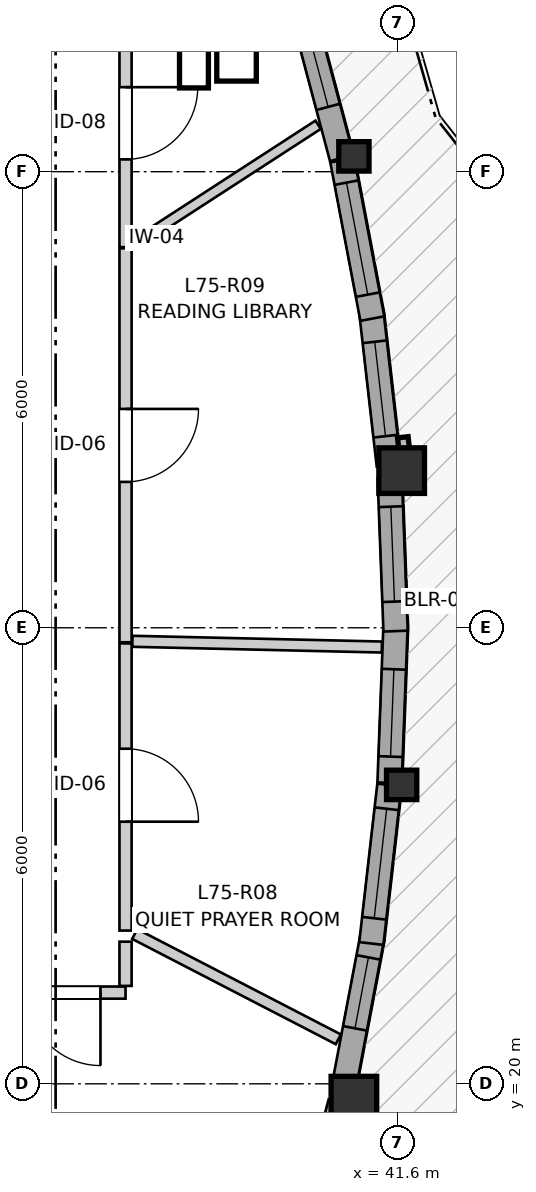
"""IFC4 building model, lengths in metres.
Left out: names, types, materials, properties, quantities, classifications, styles, units other than length and angle.
Written with IfcOpenShell. Run it as: python <this file> out.ifc"""

import sys

from ifc_helpers import new_model, si_unit, direction, frame, frame_2d, origin, origin_2d, place, context, subcontext, project, spatial, rectangle, i_section, extrude, source, transform, mapped, element, fill, save


model = new_model("IFC4")
c1 = context("Model", 3, precision=1e-05, world=origin(), true_north=direction((0.0, 1.0)))
c2 = subcontext(c1, "Body", "Model", "MODEL_VIEW")
j1 = project(units=[si_unit("LENGTHUNIT", "METRE"), si_unit("PLANEANGLEUNIT", "RADIAN")], contexts=[c1])
p1 = place(None, origin())
s1 = spatial("IfcSite", under=j1, at=p1, CompositionType="ELEMENT")
p2 = place(p1, origin())
s2 = spatial("IfcBuilding", under=s1, at=p2, CompositionType="ELEMENT")
p3 = place(p2, frame((0.0, 0.0, 250.0)))
s3 = spatial("IfcBuildingStorey", under=s2, at=p3, CompositionType="ELEMENT", Elevation=250.0)
m1 = source(origin(), c2, "Body", "SweptSolid", [
    extrude(rectangle(XDim=0.6, YDim=0.6, at=origin_2d()), origin(), (0.0, 0.0, 1.0), 2.95),
])
p4 = place(p3, frame((41.024, 19.798, 0.0), z_axis=(0.0, 0.0, 1.0), x_axis=(1.0, 0.0, 0.0)))
e1 = element("IfcColumn", 1, at=p4, inside=s3, PredefinedType="COLUMN", context=c2, shape_type="MappedRepresentation", body=[
    mapped(m1, transform((0.0, 0.0, 0.0), x_axis=(1.0, 0.0, 0.0), y_axis=(0.0, 1.0, 0.0), z_axis=(0.0, 0.0, 1.0), scale=1.0)),
])
m2 = source(origin(), c2, "Body", "SweptSolid", [
    extrude(i_section(OverallWidth=0.398, OverallDepth=0.387, WebThickness=0.019, FlangeThickness=0.03, FilletRadius=0.015, at=origin_2d()), origin(), (0.0, 0.0, 1.0), 2.95),
])
p5 = place(p3, frame((41.653, 23.933, 0.0), z_axis=(0.0, 0.0, 1.0), x_axis=(1.0, 0.0, 0.0)))
e2 = element("IfcColumn", 2, at=p5, inside=s3, PredefinedType="PILASTER", context=c2, shape_type="MappedRepresentation", body=[
    mapped(m2, transform((0.0, 0.0, 0.0), x_axis=(1.0, 0.0, 0.0), y_axis=(0.0, 1.0, 0.0), z_axis=(0.0, 0.0, 1.0), scale=1.0)),
])
p6 = place(p3, frame((41.653, 28.067, 0.0), z_axis=(0.0, 0.0, 1.0), x_axis=(1.0, 0.0, 0.0)))
e3 = element("IfcColumn", 3, at=p6, inside=s3, PredefinedType="COLUMN", context=c2, shape_type="MappedRepresentation", body=[
    mapped(m1, transform((0.0, 0.0, 0.0), x_axis=(1.0, 0.0, 0.0), y_axis=(0.0, 1.0, 0.0), z_axis=(0.0, 0.0, 1.0), scale=1.0)),
])
p7 = place(p3, frame((41.024, 32.202, 0.0), z_axis=(0.0, 0.0, 1.0), x_axis=(1.0, 0.0, 0.0)))
e4 = element("IfcColumn", 4, at=p7, inside=s3, PredefinedType="PILASTER", context=c2, shape_type="MappedRepresentation", body=[
    mapped(m2, transform((0.0, 0.0, 0.0), x_axis=(1.0, 0.0, 0.0), y_axis=(0.0, 1.0, 0.0), z_axis=(0.0, 0.0, 1.0), scale=1.0)),
])
p8 = place(p3, frame((40.31, 17.736, 0.0), z_axis=(0.0, 0.0, 1.0), x_axis=(0.257094755125, 0.966386199657, 0.0)))
e5 = element("IfcWall", 5, at=p8, inside=s3, PredefinedType="SOLIDWALL", context=c2, shape_type="SweptSolid", body=[
    extrude(rectangle(XDim=2.087, YDim=0.32, at=frame_2d((1.043, 0.0))), origin(), (0.0, 0.0, 1.0), 2.57),
])
p9 = place(p8, frame((0.24, 0.0, 0.0)))
e6 = element("IfcOpeningElement", 6, at=p9, cuts=e5, PredefinedType="OPENING", context=c2, shape_type="SweptSolid", body=[
    extrude(rectangle(XDim=1.0, YDim=2.1, at=frame_2d((0.5, 1.05))), frame((0.0, 0.17, 0.0), z_axis=(0.0, -1.0, 0.0), x_axis=(1.0, 0.0, 0.0)), (0.0, 0.0, 1.0), 0.34),
])
p10 = place(p3, frame((40.884, 19.917, 0.0), z_axis=(0.0, 0.0, 1.0), x_axis=(0.186658349395, 0.98242488802, 0.0)))
e7 = element("IfcWall", 7, at=p10, inside=s3, PredefinedType="SOLIDWALL", context=c2, shape_type="SweptSolid", body=[
    extrude(rectangle(XDim=2.052, YDim=0.32, at=frame_2d((1.026, 0.0))), origin(), (0.0, 0.0, 1.0), 2.57),
])
p11 = place(p10, frame((0.828, 0.0, 0.82)))
e8 = element("IfcOpeningElement", 8, at=p11, cuts=e7, PredefinedType="OPENING", context=c2, shape_type="SweptSolid", body=[
    extrude(rectangle(XDim=0.95, YDim=1.35, at=frame_2d((0.475, 0.675))), frame((0.0, 0.17, 0.0), z_axis=(0.0, -1.0, 0.0), x_axis=(1.0, 0.0, 0.0)), (0.0, 0.0, 1.0), 0.34),
])
p12 = place(p3, frame((41.254, 21.846, 0.0), z_axis=(0.0, 0.0, 1.0), x_axis=(0.113303807423, 0.993560389319, 0.0)))
e9 = element("IfcWall", 9, at=p12, inside=s3, PredefinedType="SOLIDWALL", context=c2, shape_type="SweptSolid", body=[
    extrude(rectangle(XDim=2.099, YDim=0.32, at=frame_2d((1.049, 0.0))), origin(), (0.0, 0.0, 1.0), 2.57),
])
p13 = place(p12, frame((0.334, 0.0, 0.82)))
e10 = element("IfcOpeningElement", 10, at=p13, cuts=e9, PredefinedType="OPENING", context=c2, shape_type="SweptSolid", body=[
    extrude(rectangle(XDim=1.45, YDim=1.25, at=frame_2d((0.725, 0.625))), frame((0.0, 0.17, 0.0), z_axis=(0.0, -1.0, 0.0), x_axis=(1.0, 0.0, 0.0)), (0.0, 0.0, 1.0), 0.34),
])
p14 = place(p3, frame((41.494, 23.959, 0.0), z_axis=(0.0, 0.0, 1.0), x_axis=(0.038028678064, 0.999276648203, 0.0)))
e11 = element("IfcWall", 11, at=p14, inside=s3, PredefinedType="SOLIDWALL", context=c2, shape_type="SweptSolid", body=[
    extrude(rectangle(XDim=2.086, YDim=0.32, at=frame_2d((1.043, 0.0))), origin(), (0.0, 0.0, 1.0), 2.57),
])
p15 = place(p14, frame((0.346, 0.0, 0.82)))
e12 = element("IfcOpeningElement", 12, at=p15, cuts=e11, PredefinedType="OPENING", context=c2, shape_type="SweptSolid", body=[
    extrude(rectangle(XDim=1.15, YDim=1.2, at=frame_2d((0.575, 0.6))), frame((0.0, 0.17, 0.0), z_axis=(0.0, -1.0, 0.0), x_axis=(1.0, 0.0, 0.0)), (0.0, 0.0, 1.0), 0.34),
])
p16 = place(p3, frame((41.573, 25.956, 0.0), z_axis=(0.0, 0.0, 1.0), x_axis=(-0.038014663796, 0.999277181435, 0.0)))
e13 = element("IfcWall", 13, at=p16, inside=s3, PredefinedType="SOLIDWALL", context=c2, shape_type="SweptSolid", body=[
    extrude(rectangle(XDim=2.017, YDim=0.32, at=frame_2d((1.008, 0.0))), origin(), (0.0, 0.0, 1.0), 2.57),
])
p17 = place(p16, frame((0.388, 0.0, 0.82)))
e14 = element("IfcOpeningElement", 14, at=p17, cuts=e13, PredefinedType="OPENING", context=c2, shape_type="SweptSolid", body=[
    extrude(rectangle(XDim=1.25, YDim=1.35, at=frame_2d((0.625, 0.675))), frame((0.0, 0.17, 0.0), z_axis=(0.0, -1.0, 0.0), x_axis=(1.0, 0.0, 0.0)), (0.0, 0.0, 1.0), 0.34),
])
p18 = place(p3, frame((41.484, 28.138, 0.0), z_axis=(0.0, 0.0, 1.0), x_axis=(-0.113244511591, 0.993567149515, 0.0)))
e15 = element("IfcWall", 15, at=p18, inside=s3, PredefinedType="SOLIDWALL", context=c2, shape_type="SweptSolid", body=[
    extrude(rectangle(XDim=2.029, YDim=0.32, at=frame_2d((1.014, 0.0))), origin(), (0.0, 0.0, 1.0), 2.57),
])
p19 = place(p18, frame((0.384, 0.0, 0.82)))
e16 = element("IfcOpeningElement", 16, at=p19, cuts=e15, PredefinedType="OPENING", context=c2, shape_type="SweptSolid", body=[
    extrude(rectangle(XDim=1.25, YDim=1.35, at=frame_2d((0.625, 0.675))), frame((0.0, 0.17, 0.0), z_axis=(0.0, -1.0, 0.0), x_axis=(1.0, 0.0, 0.0)), (0.0, 0.0, 1.0), 0.34),
])
p20 = place(p3, frame((41.267, 30.067, 0.0), z_axis=(0.0, 0.0, 1.0), x_axis=(-0.186705057177, 0.982416012504, 0.0)))
e17 = element("IfcWall", 17, at=p20, inside=s3, PredefinedType="SOLIDWALL", context=c2, shape_type="SweptSolid", body=[
    extrude(rectangle(XDim=2.122, YDim=0.32, at=frame_2d((1.061, 0.0))), origin(), (0.0, 0.0, 1.0), 2.57),
])
p21 = place(p20, frame((0.321, 0.0, 0.82)))
e18 = element("IfcOpeningElement", 18, at=p21, cuts=e17, PredefinedType="OPENING", context=c2, shape_type="SweptSolid", body=[
    extrude(rectangle(XDim=1.5, YDim=1.45, at=frame_2d((0.75, 0.725))), frame((0.0, 0.17, 0.0), z_axis=(0.0, -1.0, 0.0), x_axis=(1.0, 0.0, 0.0)), (0.0, 0.0, 1.0), 0.34),
])
p22 = place(p3, frame((40.865, 32.18, 0.0), z_axis=(0.0, 0.0, 1.0), x_axis=(-0.257021579051, 0.966405664254, 0.0)))
e19 = element("IfcWall", 19, at=p22, inside=s3, PredefinedType="SOLIDWALL", context=c2, shape_type="SweptSolid", body=[
    extrude(rectangle(XDim=2.157, YDim=0.32, at=frame_2d((1.079, 0.0))), origin(), (0.0, 0.0, 1.0), 2.57),
])
p23 = place(p22, frame((0.696, 0.0, 0.82)))
e20 = element("IfcOpeningElement", 20, at=p23, cuts=e19, PredefinedType="OPENING", context=c2, shape_type="SweptSolid", body=[
    extrude(rectangle(XDim=1.2, YDim=1.45, at=frame_2d((0.6, 0.725))), frame((0.0, 0.17, 0.0), z_axis=(0.0, -1.0, 0.0), x_axis=(1.0, 0.0, 0.0)), (0.0, 0.0, 1.0), 0.34),
])
p24 = place(p3, frame((38.02, 30.992, 0.0), z_axis=(0.0, 0.0, 1.0), x_axis=(0.0, -1.0, 0.0)))
e21 = element("IfcWall", 21, at=p24, inside=s3, PredefinedType="PARTITIONING", context=c2, shape_type="SweptSolid", body=[
    extrude(rectangle(XDim=5.183, YDim=0.16, at=frame_2d((2.591, 0.0))), origin(), (0.0, 0.0, 1.0), 2.618),
])
p25 = place(p24, frame((2.113, 0.0, 0.0)))
e22 = element("IfcOpeningElement", 22, at=p25, cuts=e21, PredefinedType="OPENING", context=c2, shape_type="SweptSolid", body=[
    extrude(rectangle(XDim=0.96, YDim=2.1, at=frame_2d((0.48, 1.05))), frame((0.0, 0.09, 0.0), z_axis=(0.0, -1.0, 0.0), x_axis=(1.0, 0.0, 0.0)), (0.0, 0.0, 1.0), 0.18),
])
p26 = place(p3, frame((38.02, 25.794, 0.0), z_axis=(0.0, 0.0, 1.0), x_axis=(0.0, -1.0, 0.0)))
e23 = element("IfcWall", 23, at=p26, inside=s3, PredefinedType="PARTITIONING", context=c2, shape_type="SweptSolid", body=[
    extrude(rectangle(XDim=3.778, YDim=0.16, at=frame_2d((1.889, 0.0))), origin(), (0.0, 0.0, 1.0), 2.618),
])
p27 = place(p26, frame((1.385, 0.0, 0.0)))
e24 = element("IfcOpeningElement", 24, at=p27, cuts=e23, PredefinedType="OPENING", context=c2, shape_type="SweptSolid", body=[
    extrude(rectangle(XDim=0.96, YDim=2.1, at=frame_2d((0.48, 1.05))), frame((0.0, 0.09, 0.0), z_axis=(0.0, -1.0, 0.0), x_axis=(1.0, 0.0, 0.0)), (0.0, 0.0, 1.0), 0.18),
])
p28 = place(p3, frame((38.02, 34.3, 0.0), z_axis=(0.0, 0.0, 1.0), x_axis=(0.0, -1.0, 0.0)))
e25 = element("IfcWall", 25, at=p28, inside=s3, PredefinedType="PARTITIONING", context=c2, shape_type="SweptSolid", body=[
    extrude(rectangle(XDim=3.293, YDim=0.16, at=frame_2d((1.646, 0.0))), origin(), (0.0, 0.0, 1.0), 2.618),
])
p29 = place(p28, frame((1.188, 0.0, 0.0)))
e26 = element("IfcOpeningElement", 26, at=p29, cuts=e25, PredefinedType="OPENING", context=c2, shape_type="SweptSolid", body=[
    extrude(rectangle(XDim=0.95, YDim=2.1, at=frame_2d((0.475, 1.05))), frame((0.0, 0.09, 0.0), z_axis=(0.0, -1.0, 0.0), x_axis=(1.0, 0.0, 0.0)), (0.0, 0.0, 1.0), 0.18),
])
p30 = place(p3, frame((38.02, 21.2, 0.0), z_axis=(0.0, 0.0, 1.0), x_axis=(-1.0, 0.0, 0.0)))
e27 = element("IfcWall", 27, at=p30, inside=s3, PredefinedType="PARTITIONING", context=c2, shape_type="SweptSolid", body=[
    extrude(rectangle(XDim=1.612, YDim=0.16, at=frame_2d((0.806, 0.0))), origin(), (0.0, 0.0, 1.0), 2.95),
])
p31 = place(p30, frame((0.33, 0.0, 0.0)))
e28 = element("IfcOpeningElement", 28, at=p31, cuts=e27, PredefinedType="OPENING", context=c2, shape_type="SweptSolid", body=[
    extrude(rectangle(XDim=0.96, YDim=2.1, at=frame_2d((0.48, 1.05))), frame((0.0, 0.09, 0.0), z_axis=(0.0, -1.0, 0.0), x_axis=(1.0, 0.0, 0.0)), (0.0, 0.0, 1.0), 0.18),
])
p32 = place(p3, frame((38.11, 25.822, 0.0), z_axis=(0.0, 0.0, 1.0), x_axis=(0.999734335157, -0.023049058746, 0.0)))
e29 = element("IfcWall", 29, at=p32, inside=s3, PredefinedType="PARTITIONING", context=c2, shape_type="SweptSolid", body=[
    extrude(rectangle(XDim=3.284, YDim=0.145, at=frame_2d((1.642, 0.0))), origin(), (0.0, 0.0, 1.0), 2.95),
])
p33 = place(p3, frame((38.14, 21.971, 0.0), z_axis=(0.0, 0.0, 1.0), x_axis=(0.888273451666, -0.459315006357, 0.0)))
e30 = element("IfcWall", 30, at=p33, inside=s3, PredefinedType="PARTITIONING", context=c2, shape_type="SweptSolid", body=[
    extrude(rectangle(XDim=3.016, YDim=0.145, at=frame_2d((1.508, 0.0))), origin(), (0.0, 0.0, 1.0), 2.95),
])
p34 = place(p3, frame((38.142, 31.053, 0.0), z_axis=(0.0, 0.0, 1.0), x_axis=(0.839000059055, 0.544131326892, 0.0)))
e31 = element("IfcWall", 31, at=p34, inside=s3, PredefinedType="PARTITIONING", context=c2, shape_type="SweptSolid", body=[
    extrude(rectangle(XDim=2.875, YDim=0.13, at=frame_2d((1.438, 0.0))), origin(), (0.0, 0.0, 1.0), 2.95),
])
p35 = place(p3, frame((38.02, 21.288, 0.0), z_axis=(0.0, 0.0, 1.0), x_axis=(0.0, 1.0, 0.0)))
e32 = element("IfcWall", 32, at=p35, inside=s3, PredefinedType="PARTITIONING", context=c2, shape_type="SweptSolid", body=[
    extrude(rectangle(XDim=0.582, YDim=0.16, at=frame_2d((0.291, 0.0))), origin(), (0.0, 0.0, 1.0), 2.618),
])
m3 = source(origin(), c2, "Body", "SweptSolid", [
    extrude(rectangle(XDim=0.95, YDim=1.35, at=frame_2d((0.475, 0.675))), frame((0.0, 0.03, 0.0), z_axis=(0.0, -1.0, 0.0), x_axis=(1.0, 0.0, 0.0)), (0.0, 0.0, 1.0), 0.06),
])
p36 = place(p11, origin())
e33 = element("IfcWindow", 33, at=p36, inside=s3, PartitioningType="SINGLE_PANEL", PredefinedType="WINDOW", context=c2, shape_type="MappedRepresentation", body=[
    mapped(m3, transform((0.0, 0.0, 0.0), x_axis=(1.0, 0.0, 0.0), y_axis=(0.0, 1.0, 0.0), z_axis=(0.0, 0.0, 1.0), scale=1.0)),
])
fill(e8, e33)
m4 = source(origin(), c2, "Body", "SweptSolid", [
    extrude(rectangle(XDim=1.45, YDim=1.25, at=frame_2d((0.725, 0.625))), frame((0.0, 0.03, 0.0), z_axis=(0.0, -1.0, 0.0), x_axis=(1.0, 0.0, 0.0)), (0.0, 0.0, 1.0), 0.06),
])
p37 = place(p13, origin())
e34 = element("IfcWindow", 34, at=p37, inside=s3, PartitioningType="SINGLE_PANEL", PredefinedType="WINDOW", context=c2, shape_type="MappedRepresentation", body=[
    mapped(m4, transform((0.0, 0.0, 0.0), x_axis=(1.0, 0.0, 0.0), y_axis=(0.0, 1.0, 0.0), z_axis=(0.0, 0.0, 1.0), scale=1.0)),
])
fill(e10, e34)
m5 = source(origin(), c2, "Body", "SweptSolid", [
    extrude(rectangle(XDim=1.15, YDim=1.2, at=frame_2d((0.575, 0.6))), frame((0.0, 0.03, 0.0), z_axis=(0.0, -1.0, 0.0), x_axis=(1.0, 0.0, 0.0)), (0.0, 0.0, 1.0), 0.06),
])
p38 = place(p15, origin())
e35 = element("IfcWindow", 35, at=p38, inside=s3, PartitioningType="SINGLE_PANEL", PredefinedType="WINDOW", context=c2, shape_type="MappedRepresentation", body=[
    mapped(m5, transform((0.0, 0.0, 0.0), x_axis=(1.0, 0.0, 0.0), y_axis=(0.0, 1.0, 0.0), z_axis=(0.0, 0.0, 1.0), scale=1.0)),
])
fill(e12, e35)
m6 = source(origin(), c2, "Body", "SweptSolid", [
    extrude(rectangle(XDim=1.25, YDim=1.35, at=frame_2d((0.625, 0.675))), frame((0.0, 0.03, 0.0), z_axis=(0.0, -1.0, 0.0), x_axis=(1.0, 0.0, 0.0)), (0.0, 0.0, 1.0), 0.06),
])
p39 = place(p17, origin())
e36 = element("IfcWindow", 36, at=p39, inside=s3, PartitioningType="SINGLE_PANEL", PredefinedType="WINDOW", context=c2, shape_type="MappedRepresentation", body=[
    mapped(m6, transform((0.0, 0.0, 0.0), x_axis=(1.0, 0.0, 0.0), y_axis=(0.0, 1.0, 0.0), z_axis=(0.0, 0.0, 1.0), scale=1.0)),
])
fill(e14, e36)
p40 = place(p19, origin())
e37 = element("IfcWindow", 37, at=p40, inside=s3, PartitioningType="SINGLE_PANEL", PredefinedType="WINDOW", context=c2, shape_type="MappedRepresentation", body=[
    mapped(m6, transform((0.0, 0.0, 0.0), x_axis=(1.0, 0.0, 0.0), y_axis=(0.0, 1.0, 0.0), z_axis=(0.0, 0.0, 1.0), scale=1.0)),
])
fill(e16, e37)
m7 = source(origin(), c2, "Body", "SweptSolid", [
    extrude(rectangle(XDim=1.5, YDim=1.45, at=frame_2d((0.75, 0.725))), frame((0.0, 0.03, 0.0), z_axis=(0.0, -1.0, 0.0), x_axis=(1.0, 0.0, 0.0)), (0.0, 0.0, 1.0), 0.06),
])
p41 = place(p21, origin())
e38 = element("IfcWindow", 38, at=p41, inside=s3, PartitioningType="SINGLE_PANEL", PredefinedType="WINDOW", context=c2, shape_type="MappedRepresentation", body=[
    mapped(m7, transform((0.0, 0.0, 0.0), x_axis=(1.0, 0.0, 0.0), y_axis=(0.0, 1.0, 0.0), z_axis=(0.0, 0.0, 1.0), scale=1.0)),
])
fill(e18, e38)
m8 = source(origin(), c2, "Body", "SweptSolid", [
    extrude(rectangle(XDim=1.2, YDim=1.45, at=frame_2d((0.6, 0.725))), frame((0.0, 0.03, 0.0), z_axis=(0.0, -1.0, 0.0), x_axis=(1.0, 0.0, 0.0)), (0.0, 0.0, 1.0), 0.06),
])
p42 = place(p23, origin())
e39 = element("IfcWindow", 39, at=p42, inside=s3, PartitioningType="SINGLE_PANEL", PredefinedType="WINDOW", context=c2, shape_type="MappedRepresentation", body=[
    mapped(m8, transform((0.0, 0.0, 0.0), x_axis=(1.0, 0.0, 0.0), y_axis=(0.0, 1.0, 0.0), z_axis=(0.0, 0.0, 1.0), scale=1.0)),
])
fill(e20, e39)
m9 = source(origin(), c2, "Body", "SweptSolid", [
    extrude(rectangle(XDim=0.96, YDim=2.1, at=frame_2d((0.48, 1.05))), frame((0.0, 0.025, 0.0), z_axis=(0.0, -1.0, 0.0), x_axis=(1.0, 0.0, 0.0)), (0.0, 0.0, 1.0), 0.05),
])
p43 = place(p25, origin())
e40 = element("IfcDoor", 40, at=p43, inside=s3, OperationType="SINGLE_SWING_LEFT", PredefinedType="DOOR", context=c2, shape_type="MappedRepresentation", body=[
    mapped(m9, transform((0.0, 0.0, 0.0), x_axis=(1.0, 0.0, 0.0), y_axis=(0.0, 1.0, 0.0), z_axis=(0.0, 0.0, 1.0), scale=1.0)),
])
fill(e22, e40)
p44 = place(p27, origin())
e41 = element("IfcDoor", 41, at=p44, inside=s3, OperationType="SINGLE_SWING_RIGHT", PredefinedType="DOOR", context=c2, shape_type="MappedRepresentation", body=[
    mapped(m9, transform((0.0, 0.0, 0.0), x_axis=(1.0, 0.0, 0.0), y_axis=(0.0, 1.0, 0.0), z_axis=(0.0, 0.0, 1.0), scale=1.0)),
])
fill(e24, e41)
m10 = source(origin(), c2, "Body", "SweptSolid", [
    extrude(rectangle(XDim=0.95, YDim=2.1, at=frame_2d((0.475, 1.05))), frame((0.0, 0.025, 0.0), z_axis=(0.0, -1.0, 0.0), x_axis=(1.0, 0.0, 0.0)), (0.0, 0.0, 1.0), 0.05),
])
p45 = place(p29, origin())
e42 = element("IfcDoor", 42, at=p45, inside=s3, OperationType="SINGLE_SWING_LEFT", PredefinedType="DOOR", context=c2, shape_type="MappedRepresentation", body=[
    mapped(m10, transform((0.0, 0.0, 0.0), x_axis=(1.0, 0.0, 0.0), y_axis=(0.0, 1.0, 0.0), z_axis=(0.0, 0.0, 1.0), scale=1.0)),
])
fill(e26, e42)
p46 = place(p31, origin())
e43 = element("IfcDoor", 43, at=p46, inside=s3, OperationType="SINGLE_SWING_LEFT", PredefinedType="DOOR", context=c2, shape_type="MappedRepresentation", body=[
    mapped(m9, transform((0.0, 0.0, 0.0), x_axis=(1.0, 0.0, 0.0), y_axis=(0.0, 1.0, 0.0), z_axis=(0.0, 0.0, 1.0), scale=1.0)),
])
fill(e28, e43)
save(model, sys.argv[1])
